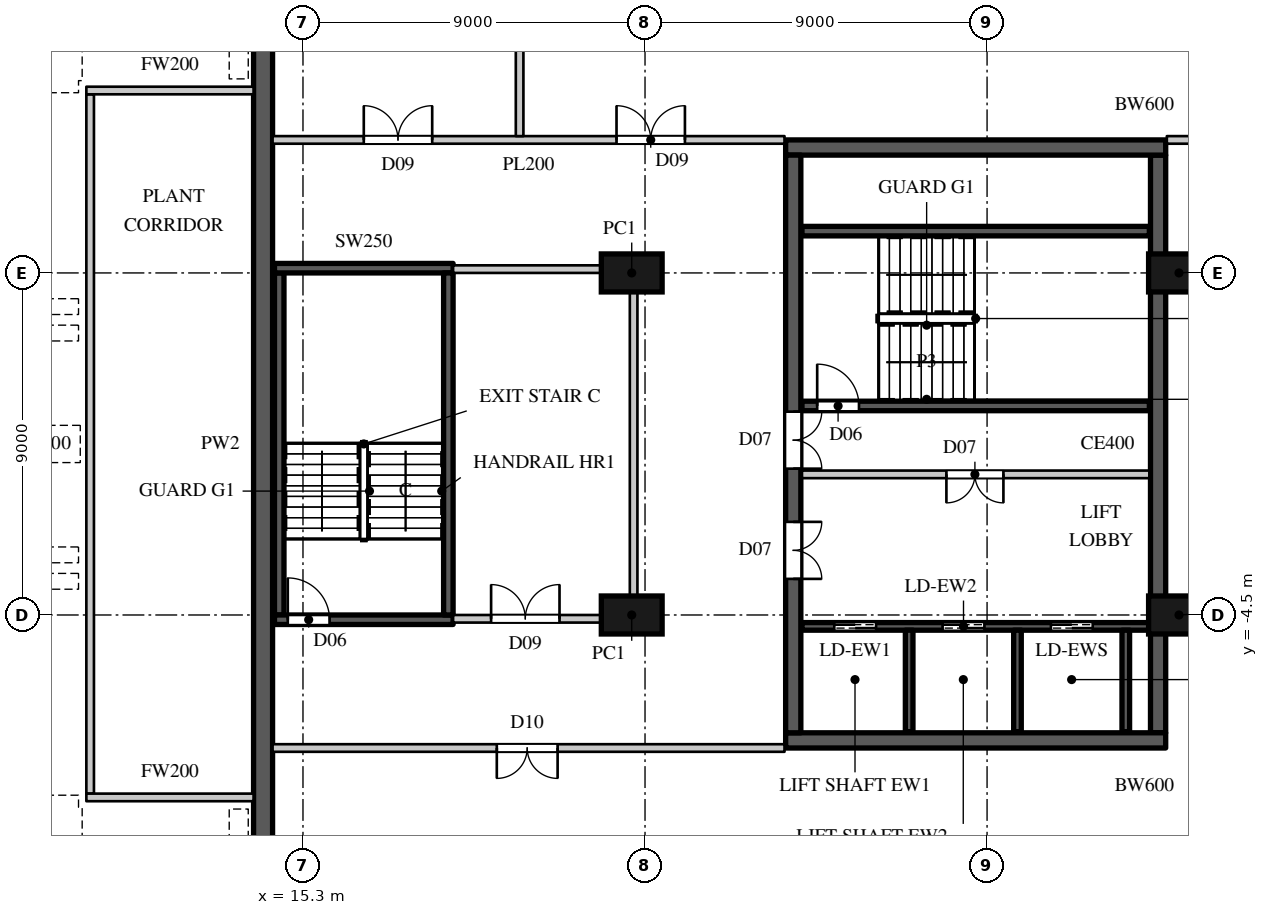
"""IFC4 building model, lengths in metres.
Left out: names, types, materials, properties, quantities, classifications, styles, units other than length and angle.
Written with IfcOpenShell. Run it as: python <this file> out.ifc"""

import sys

from ifc_helpers import new_model, si_unit, direction, frame, frame_2d, origin, origin_2d, place, context, subcontext, project, spatial, rectangle, extrude, element, fill, save


model = new_model("IFC4")
c1 = context("Model", 3, precision=1e-05, world=origin(), true_north=direction((0.0, 1.0)))
c2 = subcontext(c1, "Body", "Model", "MODEL_VIEW")
j1 = project(units=[si_unit("LENGTHUNIT", "METRE"), si_unit("PLANEANGLEUNIT", "RADIAN")], contexts=[c1])
p1 = place(None, origin())
s1 = spatial("IfcSite", under=j1, at=p1, CompositionType="ELEMENT")
p2 = place(p1, origin())
s2 = spatial("IfcBuilding", under=s1, at=p2, CompositionType="ELEMENT")
p3 = place(p2, frame((0.0, 0.0, 29.0)))
s3 = spatial("IfcBuildingStorey", under=s2, at=p3, CompositionType="ELEMENT", Elevation=29.0)
p4 = place(p3, frame((14.25, -19.5, 0.0), z_axis=(0.0, 0.0, 1.0), x_axis=(0.0, 1.0, 0.0)))
e1 = element("IfcWall", 1, at=p4, inside=s3, PredefinedType="SOLIDWALL", context=c2, shape_type="SweptSolid", body=[
    extrude(rectangle(XDim=39.0, YDim=0.5, at=frame_2d((19.5, 0.0))), origin(), (0.0, 0.0, 1.0), 7.0),
])
for number, where, z_axis, x_axis in (
    (2, (23.95, -4.5, 0.0), (0.0, 0.0, 1.0), (0.0, 1.0, 0.0)),
    (3, (23.95, 4.5, 0.0), (0.0, 0.0, 1.0), (0.0, 1.0, 0.0)),
    (4, (38.35, -4.5, 0.0), (0.0, 0.0, 1.0), (0.0, 1.0, 0.0)),
    (5, (38.35, 4.5, 0.0), (0.0, 0.0, 1.0), (0.0, 1.0, 0.0)),
):
    element("IfcColumn", number, at=place(p3, frame(where, z_axis=z_axis, x_axis=x_axis)), inside=s3, PredefinedType="COLUMN", context=c2, shape_type="SweptSolid", body=[
        extrude(rectangle(XDim=1.0, YDim=1.6, at=origin_2d()), origin(), (0.0, 0.0, 1.0), 7.0),
    ])
for number, where, z_axis, x_axis in (
    (6, (28.0, 7.8, 0.0), (0.0, 0.0, 1.0), (1.0, 0.0, 0.0)),
    (7, (28.0, -7.8, 0.0), (0.0, 0.0, 1.0), (1.0, 0.0, 0.0)),
):
    element("IfcWall", number, at=place(p3, frame(where, z_axis=z_axis, x_axis=x_axis)), inside=s3, PredefinedType="SHEAR", context=c2, shape_type="SweptSolid", body=[
        extrude(rectangle(XDim=10.0, YDim=0.4, at=frame_2d((5.0, 0.0))), origin(), (0.0, 0.0, 1.0), 7.0),
    ])
p5 = place(p3, frame((37.8, -7.6, 0.0), z_axis=(0.0, 0.0, 1.0), x_axis=(0.0, 1.0, 0.0)))
e8 = element("IfcWall", 8, at=p5, inside=s3, PredefinedType="SHEAR", context=c2, shape_type="SweptSolid", body=[
    extrude(rectangle(XDim=15.2, YDim=0.4, at=frame_2d((7.6, 0.0))), origin(), (0.0, 0.0, 1.0), 7.0),
])
p6 = place(p3, frame((28.2, -7.6, 0.0), z_axis=(0.0, 0.0, 1.0), x_axis=(0.0, 1.0, 0.0)))
e9 = element("IfcWall", 9, at=p6, inside=s3, PredefinedType="SHEAR", context=c2, shape_type="SweptSolid", body=[
    extrude(rectangle(XDim=15.2, YDim=0.4, at=frame_2d((7.6, 0.0))), origin(), (0.0, 0.0, 1.0), 7.0),
])
p7 = place(p6, frame((4.05, 0.0, 0.0)))
e10 = element("IfcOpeningElement", 10, at=p7, cuts=e9, PredefinedType="OPENING", context=c2, shape_type="SweptSolid", body=[
    extrude(rectangle(XDim=1.5, YDim=2.4, at=frame_2d((0.75, 1.2))), frame((0.0, 0.21, 0.0), z_axis=(0.0, -1.0, 0.0), x_axis=(1.0, 0.0, 0.0)), (0.0, 0.0, 1.0), 0.42),
])
p8 = place(p6, frame((6.95, 0.0, 0.0)))
e11 = element("IfcOpeningElement", 11, at=p8, cuts=e9, PredefinedType="OPENING", context=c2, shape_type="SweptSolid", body=[
    extrude(rectangle(XDim=1.5, YDim=2.4, at=frame_2d((0.75, 1.2))), frame((0.0, 0.21, 0.0), z_axis=(0.0, -1.0, 0.0), x_axis=(1.0, 0.0, 0.0)), (0.0, 0.0, 1.0), 0.42),
])
p9 = place(p3, frame((9.7, -9.2, 0.0), z_axis=(0.0, 0.0, 1.0), x_axis=(0.0, 1.0, 0.0)))
e12 = element("IfcWall", 12, at=p9, inside=s3, PredefinedType="PARTITIONING", context=c2, shape_type="SweptSolid", body=[
    extrude(rectangle(XDim=18.4, YDim=0.2, at=frame_2d((9.2, 0.0))), origin(), (0.0, 0.0, 1.0), 6.598),
])
for number, where, z_axis, x_axis in (
    (13, (9.6, -9.3, 0.0), (0.0, 0.0, 1.0), (1.0, 0.0, 0.0)),
    (14, (9.6, 9.3, 0.0), (0.0, 0.0, 1.0), (1.0, 0.0, 0.0)),
):
    element("IfcWall", number, at=place(p3, frame(where, z_axis=z_axis, x_axis=x_axis)), inside=s3, PredefinedType="PARTITIONING", context=c2, shape_type="SweptSolid", body=[
        extrude(rectangle(XDim=4.4, YDim=0.2, at=frame_2d((2.2, 0.0))), origin(), (0.0, 0.0, 1.0), 6.598),
    ])
p10 = place(p3, frame((14.5, -8.0, 0.0), z_axis=(0.0, 0.0, 1.0), x_axis=(1.0, 0.0, 0.0)))
e15 = element("IfcWall", 15, at=p10, inside=s3, PredefinedType="PARTITIONING", context=c2, shape_type="SweptSolid", body=[
    extrude(rectangle(XDim=13.47, YDim=0.2, at=frame_2d((6.735, 0.0))), origin(), (0.0, 0.0, 1.0), 6.598),
])
p11 = place(p10, frame((5.9, 0.0, 0.0)))
e16 = element("IfcOpeningElement", 16, at=p11, cuts=e15, PredefinedType="OPENING", context=c2, shape_type="SweptSolid", body=[
    extrude(rectangle(XDim=1.6, YDim=2.4, at=frame_2d((0.8, 1.2))), frame((0.0, 0.11, 0.0), z_axis=(0.0, -1.0, 0.0), x_axis=(1.0, 0.0, 0.0)), (0.0, 0.0, 1.0), 0.22),
])
p12 = place(p3, frame((28.43, -0.8, 0.0), z_axis=(0.0, 0.0, 1.0), x_axis=(1.0, 0.0, 0.0)))
e17 = element("IfcWall", 17, at=p12, inside=s3, PredefinedType="PARTITIONING", context=c2, shape_type="SweptSolid", body=[
    extrude(rectangle(XDim=9.14, YDim=0.2, at=frame_2d((4.57, 0.0))), origin(), (0.0, 0.0, 1.0), 6.598),
])
p13 = place(p12, frame((3.8, 0.0, 0.0)))
e18 = element("IfcOpeningElement", 18, at=p13, cuts=e17, PredefinedType="OPENING", context=c2, shape_type="SweptSolid", body=[
    extrude(rectangle(XDim=1.5, YDim=2.4, at=frame_2d((0.75, 1.2))), frame((0.0, 0.11, 0.0), z_axis=(0.0, -1.0, 0.0), x_axis=(1.0, 0.0, 0.0)), (0.0, 0.0, 1.0), 0.22),
])
p14 = place(p3, frame((14.5, 8.0, 0.0), z_axis=(0.0, 0.0, 1.0), x_axis=(1.0, 0.0, 0.0)))
e19 = element("IfcWall", 19, at=p14, inside=s3, PredefinedType="PARTITIONING", context=c2, shape_type="SweptSolid", body=[
    extrude(rectangle(XDim=13.47, YDim=0.2, at=frame_2d((6.735, 0.0))), origin(), (0.0, 0.0, 1.0), 6.598),
])
p15 = place(p14, frame((2.4, 0.0, 0.0)))
e20 = element("IfcOpeningElement", 20, at=p15, cuts=e19, PredefinedType="OPENING", context=c2, shape_type="SweptSolid", body=[
    extrude(rectangle(XDim=1.8, YDim=2.4, at=frame_2d((0.9, 1.2))), frame((0.0, 0.11, 0.0), z_axis=(0.0, -1.0, 0.0), x_axis=(1.0, 0.0, 0.0)), (0.0, 0.0, 1.0), 0.22),
])
p16 = place(p14, frame((9.05, 0.0, 0.0)))
e21 = element("IfcOpeningElement", 21, at=p16, cuts=e19, PredefinedType="OPENING", context=c2, shape_type="SweptSolid", body=[
    extrude(rectangle(XDim=1.8, YDim=2.4, at=frame_2d((0.9, 1.2))), frame((0.0, 0.11, 0.0), z_axis=(0.0, -1.0, 0.0), x_axis=(1.0, 0.0, 0.0)), (0.0, 0.0, 1.0), 0.22),
])
p17 = place(p3, frame((19.25, -4.6, 0.0), z_axis=(0.0, 0.0, 1.0), x_axis=(1.0, 0.0, 0.0)))
e22 = element("IfcWall", 22, at=p17, inside=s3, PredefinedType="PARTITIONING", context=c2, shape_type="SweptSolid", body=[
    extrude(rectangle(XDim=3.9, YDim=0.2, at=frame_2d((1.95, 0.0))), origin(), (0.0, 0.0, 1.0), 6.598),
])
p18 = place(p17, frame((1.0, 0.0, 0.0)))
e23 = element("IfcOpeningElement", 23, at=p18, cuts=e22, PredefinedType="OPENING", context=c2, shape_type="SweptSolid", body=[
    extrude(rectangle(XDim=1.8, YDim=2.4, at=frame_2d((0.9, 1.2))), frame((0.0, 0.11, 0.0), z_axis=(0.0, -1.0, 0.0), x_axis=(1.0, 0.0, 0.0)), (0.0, 0.0, 1.0), 0.22),
])
p19 = place(p3, frame((19.25, 4.6, 0.0), z_axis=(0.0, 0.0, 1.0), x_axis=(1.0, 0.0, 0.0)))
e24 = element("IfcWall", 24, at=p19, inside=s3, PredefinedType="PARTITIONING", context=c2, shape_type="SweptSolid", body=[
    extrude(rectangle(XDim=3.9, YDim=0.2, at=frame_2d((1.95, 0.0))), origin(), (0.0, 0.0, 1.0), 6.598),
])
p20 = place(p3, frame((21.0, 8.1, 0.0), z_axis=(0.0, 0.0, 1.0), x_axis=(0.0, 1.0, 0.0)))
e25 = element("IfcWall", 25, at=p20, inside=s3, PredefinedType="PARTITIONING", context=c2, shape_type="SweptSolid", body=[
    extrude(rectangle(XDim=19.025, YDim=0.2, at=frame_2d((9.512, 0.0))), origin(), (0.0, 0.0, 1.0), 6.598),
])
p21 = place(p3, frame((24.0, -4.0, 0.0), z_axis=(0.0, 0.0, 1.0), x_axis=(0.0, 1.0, 0.0)))
e26 = element("IfcWall", 26, at=p21, inside=s3, PredefinedType="PARTITIONING", context=c2, shape_type="SweptSolid", body=[
    extrude(rectangle(XDim=8.0, YDim=0.2, at=frame_2d((4.0, 0.0))), origin(), (0.0, 0.0, 1.0), 6.598),
])
p22 = place(p3, frame((38.03, 8.0, 0.0), z_axis=(0.0, 0.0, 1.0), x_axis=(1.0, 0.0, 0.0)))
e27 = element("IfcWall", 27, at=p22, inside=s3, PredefinedType="PARTITIONING", context=c2, shape_type="SweptSolid", body=[
    extrude(rectangle(XDim=0.595, YDim=0.2, at=frame_2d((0.297, 0.0))), origin(), (0.0, 0.0, 1.0), 6.598),
])
p23 = place(p3, frame((28.43, -4.8, 0.0), z_axis=(0.0, 0.0, 1.0), x_axis=(1.0, 0.0, 0.0)))
e28 = element("IfcWall", 28, at=p23, inside=s3, PredefinedType="SHEAR", context=c2, shape_type="SweptSolid", body=[
    extrude(rectangle(XDim=9.13, YDim=0.2, at=frame_2d((4.565, 0.0))), origin(), (0.0, 0.0, 1.0), 6.598),
])
p24 = place(p23, frame((0.85, 0.0, 0.0)))
e29 = element("IfcOpeningElement", 29, at=p24, cuts=e28, PredefinedType="OPENING", context=c2, shape_type="SweptSolid", body=[
    extrude(rectangle(XDim=1.1, YDim=2.2, at=frame_2d((0.55, 1.1))), frame((0.0, 0.11, 0.0), z_axis=(0.0, -1.0, 0.0), x_axis=(1.0, 0.0, 0.0)), (0.0, 0.0, 1.0), 0.22),
])
p25 = place(p23, frame((3.7, 0.0, 0.0)))
e30 = element("IfcOpeningElement", 30, at=p25, cuts=e28, PredefinedType="OPENING", context=c2, shape_type="SweptSolid", body=[
    extrude(rectangle(XDim=1.1, YDim=2.2, at=frame_2d((0.55, 1.1))), frame((0.0, 0.11, 0.0), z_axis=(0.0, -1.0, 0.0), x_axis=(1.0, 0.0, 0.0)), (0.0, 0.0, 1.0), 0.22),
])
p26 = place(p23, frame((6.55, 0.0, 0.0)))
e31 = element("IfcOpeningElement", 31, at=p26, cuts=e28, PredefinedType="OPENING", context=c2, shape_type="SweptSolid", body=[
    extrude(rectangle(XDim=1.1, YDim=2.2, at=frame_2d((0.55, 1.1))), frame((0.0, 0.11, 0.0), z_axis=(0.0, -1.0, 0.0), x_axis=(1.0, 0.0, 0.0)), (0.0, 0.0, 1.0), 0.22),
])
for number, where, z_axis, x_axis in (
    (32, (31.25, -7.57, 0.0), (0.0, 0.0, 1.0), (0.0, 1.0, 0.0)),
    (33, (34.1, -7.57, 0.0), (0.0, 0.0, 1.0), (0.0, 1.0, 0.0)),
):
    element("IfcWall", number, at=place(p3, frame(where, z_axis=z_axis, x_axis=x_axis)), inside=s3, PredefinedType="SHEAR", context=c2, shape_type="SweptSolid", body=[
        extrude(rectangle(XDim=2.67, YDim=0.2, at=frame_2d((1.335, 0.0))), origin(), (0.0, 0.0, 1.0), 7.0),
    ])
p27 = place(p3, frame((36.95, -7.57, 0.0), z_axis=(0.0, 0.0, 1.0), x_axis=(0.0, 1.0, 0.0)))
e34 = element("IfcWall", 34, at=p27, inside=s3, PredefinedType="SHEAR", context=c2, shape_type="SweptSolid", body=[
    extrude(rectangle(XDim=2.67, YDim=0.2, at=frame_2d((1.335, 0.0))), origin(), (0.0, 0.0, 1.0), 6.598),
])
p28 = place(p3, frame((14.675, -4.5, 0.0), z_axis=(0.0, 0.0, 1.0), x_axis=(0.0, 1.0, 0.0)))
e35 = element("IfcWall", 35, at=p28, inside=s3, PredefinedType="SHEAR", context=c2, shape_type="SweptSolid", body=[
    extrude(rectangle(XDim=9.0, YDim=0.25, at=frame_2d((4.5, 0.0))), origin(), (0.0, 0.0, 1.0), 6.6),
])
p29 = place(p3, frame((14.55, -4.625, 0.0), z_axis=(0.0, 0.0, 1.0), x_axis=(1.0, 0.0, 0.0)))
e36 = element("IfcWall", 36, at=p29, inside=s3, PredefinedType="SHEAR", context=c2, shape_type="SweptSolid", body=[
    extrude(rectangle(XDim=4.7, YDim=0.25, at=frame_2d((2.35, 0.0))), origin(), (0.0, 0.0, 1.0), 6.6),
])
p30 = place(p29, frame((0.35, 0.0, 0.0)))
e37 = element("IfcOpeningElement", 37, at=p30, cuts=e36, PredefinedType="OPENING", context=c2, shape_type="SweptSolid", body=[
    extrude(rectangle(XDim=1.1, YDim=2.2, at=frame_2d((0.55, 1.1))), frame((0.0, 0.135, 0.0), z_axis=(0.0, -1.0, 0.0), x_axis=(1.0, 0.0, 0.0)), (0.0, 0.0, 1.0), 0.27),
])
p31 = place(p3, frame((14.55, 4.625, 0.0), z_axis=(0.0, 0.0, 1.0), x_axis=(1.0, 0.0, 0.0)))
e38 = element("IfcWall", 38, at=p31, inside=s3, PredefinedType="SHEAR", context=c2, shape_type="SweptSolid", body=[
    extrude(rectangle(XDim=4.7, YDim=0.25, at=frame_2d((2.35, 0.0))), origin(), (0.0, 0.0, 1.0), 6.6),
])
p32 = place(p3, frame((19.125, -4.5, 0.0), z_axis=(0.0, 0.0, 1.0), x_axis=(0.0, 1.0, 0.0)))
e39 = element("IfcWall", 39, at=p32, inside=s3, PredefinedType="SHEAR", context=c2, shape_type="SweptSolid", body=[
    extrude(rectangle(XDim=9.0, YDim=0.25, at=frame_2d((4.5, 0.0))), origin(), (0.0, 0.0, 1.0), 6.6),
])
p33 = place(p3, frame((28.43, 1.0, 0.0), z_axis=(0.0, 0.0, 1.0), x_axis=(1.0, 0.0, 0.0)))
e40 = element("IfcWall", 40, at=p33, inside=s3, PredefinedType="SHEAR", context=c2, shape_type="SweptSolid", body=[
    extrude(rectangle(XDim=9.14, YDim=0.25, at=frame_2d((4.57, 0.0))), origin(), (0.0, 0.0, 1.0), 6.598),
])
p34 = place(p33, frame((0.4, 0.0, 0.0)))
e41 = element("IfcOpeningElement", 41, at=p34, cuts=e40, PredefinedType="OPENING", context=c2, shape_type="SweptSolid", body=[
    extrude(rectangle(XDim=1.1, YDim=2.2, at=frame_2d((0.55, 1.1))), frame((0.0, 0.135, 0.0), z_axis=(0.0, -1.0, 0.0), x_axis=(1.0, 0.0, 0.0)), (0.0, 0.0, 1.0), 0.27),
])
p35 = place(p3, frame((28.43, 5.6, 0.0), z_axis=(0.0, 0.0, 1.0), x_axis=(1.0, 0.0, 0.0)))
e42 = element("IfcWall", 42, at=p35, inside=s3, PredefinedType="SHEAR", context=c2, shape_type="SweptSolid", body=[
    extrude(rectangle(XDim=9.14, YDim=0.25, at=frame_2d((4.57, 0.0))), origin(), (0.0, 0.0, 1.0), 6.598),
])
p36 = place(p34, origin())
e43 = element("IfcDoor", 43, at=p36, inside=s3, OperationType="SINGLE_SWING_LEFT", PredefinedType="DOOR", context=c2, shape_type="SweptSolid", body=[
    extrude(rectangle(XDim=1.1, YDim=2.2, at=frame_2d((0.55, 1.1))), frame((0.0, 0.025, 0.0), z_axis=(0.0, -1.0, 0.0), x_axis=(1.0, 0.0, 0.0)), (0.0, 0.0, 1.0), 0.05),
])
fill(e41, e43)
p37 = place(p13, origin())
e44 = element("IfcDoor", 44, at=p37, inside=s3, OperationType="DOUBLE_DOOR_SINGLE_SWING", PredefinedType="DOOR", context=c2, shape_type="SweptSolid", body=[
    extrude(rectangle(XDim=1.5, YDim=2.4, at=frame_2d((0.75, 1.2))), frame((0.0, 0.025, 0.0), z_axis=(0.0, -1.0, 0.0), x_axis=(1.0, 0.0, 0.0)), (0.0, 0.0, 1.0), 0.05),
])
fill(e18, e44)
p38 = place(p24, origin())
e45 = element("IfcDoor", 45, at=p38, inside=s3, OperationType="DOUBLE_DOOR_SLIDING", PredefinedType="DOOR", context=c2, shape_type="SweptSolid", body=[
    extrude(rectangle(XDim=1.1, YDim=2.2, at=frame_2d((0.55, 1.1))), frame((0.0, 0.025, 0.0), z_axis=(0.0, -1.0, 0.0), x_axis=(1.0, 0.0, 0.0)), (0.0, 0.0, 1.0), 0.05),
])
fill(e29, e45)
p39 = place(p25, origin())
e46 = element("IfcDoor", 46, at=p39, inside=s3, OperationType="DOUBLE_DOOR_SLIDING", PredefinedType="DOOR", context=c2, shape_type="SweptSolid", body=[
    extrude(rectangle(XDim=1.1, YDim=2.2, at=frame_2d((0.55, 1.1))), frame((0.0, 0.025, 0.0), z_axis=(0.0, -1.0, 0.0), x_axis=(1.0, 0.0, 0.0)), (0.0, 0.0, 1.0), 0.05),
])
fill(e30, e46)
p40 = place(p26, origin())
e47 = element("IfcDoor", 47, at=p40, inside=s3, OperationType="DOUBLE_DOOR_SLIDING", PredefinedType="DOOR", context=c2, shape_type="SweptSolid", body=[
    extrude(rectangle(XDim=1.1, YDim=2.2, at=frame_2d((0.55, 1.1))), frame((0.0, 0.025, 0.0), z_axis=(0.0, -1.0, 0.0), x_axis=(1.0, 0.0, 0.0)), (0.0, 0.0, 1.0), 0.05),
])
fill(e31, e47)
p41 = place(p11, origin())
e48 = element("IfcDoor", 48, at=p41, inside=s3, OperationType="DOUBLE_DOOR_SINGLE_SWING", PredefinedType="DOOR", context=c2, shape_type="SweptSolid", body=[
    extrude(rectangle(XDim=1.6, YDim=2.4, at=frame_2d((0.8, 1.2))), frame((0.0, 0.025, 0.0), z_axis=(0.0, -1.0, 0.0), x_axis=(1.0, 0.0, 0.0)), (0.0, 0.0, 1.0), 0.05),
])
fill(e16, e48)
p42 = place(p15, origin())
e49 = element("IfcDoor", 49, at=p42, inside=s3, OperationType="DOUBLE_DOOR_SINGLE_SWING", PredefinedType="DOOR", context=c2, shape_type="SweptSolid", body=[
    extrude(rectangle(XDim=1.8, YDim=2.4, at=frame_2d((0.9, 1.2))), frame((0.0, 0.025, 0.0), z_axis=(0.0, -1.0, 0.0), x_axis=(1.0, 0.0, 0.0)), (0.0, 0.0, 1.0), 0.05),
])
fill(e20, e49)
p43 = place(p16, origin())
e50 = element("IfcDoor", 50, at=p43, inside=s3, OperationType="DOUBLE_DOOR_SINGLE_SWING", PredefinedType="DOOR", context=c2, shape_type="SweptSolid", body=[
    extrude(rectangle(XDim=1.8, YDim=2.4, at=frame_2d((0.9, 1.2))), frame((0.0, 0.025, 0.0), z_axis=(0.0, -1.0, 0.0), x_axis=(1.0, 0.0, 0.0)), (0.0, 0.0, 1.0), 0.05),
])
fill(e21, e50)
p44 = place(p18, origin())
e51 = element("IfcDoor", 51, at=p44, inside=s3, OperationType="DOUBLE_DOOR_SINGLE_SWING", PredefinedType="DOOR", context=c2, shape_type="SweptSolid", body=[
    extrude(rectangle(XDim=1.8, YDim=2.4, at=frame_2d((0.9, 1.2))), frame((0.0, 0.025, 0.0), z_axis=(0.0, -1.0, 0.0), x_axis=(1.0, 0.0, 0.0)), (0.0, 0.0, 1.0), 0.05),
])
fill(e23, e51)
p45 = place(p7, origin())
e52 = element("IfcDoor", 52, at=p45, inside=s3, OperationType="DOUBLE_DOOR_SINGLE_SWING", PredefinedType="DOOR", context=c2, shape_type="SweptSolid", body=[
    extrude(rectangle(XDim=1.5, YDim=2.4, at=frame_2d((0.75, 1.2))), frame((0.0, 0.025, 0.0), z_axis=(0.0, -1.0, 0.0), x_axis=(1.0, 0.0, 0.0)), (0.0, 0.0, 1.0), 0.05),
])
fill(e10, e52)
p46 = place(p8, origin())
e53 = element("IfcDoor", 53, at=p46, inside=s3, OperationType="DOUBLE_DOOR_SINGLE_SWING", PredefinedType="DOOR", context=c2, shape_type="SweptSolid", body=[
    extrude(rectangle(XDim=1.5, YDim=2.4, at=frame_2d((0.75, 1.2))), frame((0.0, 0.025, 0.0), z_axis=(0.0, -1.0, 0.0), x_axis=(1.0, 0.0, 0.0)), (0.0, 0.0, 1.0), 0.05),
])
fill(e11, e53)
p47 = place(p30, origin())
e54 = element("IfcDoor", 54, at=p47, inside=s3, OperationType="SINGLE_SWING_LEFT", PredefinedType="DOOR", context=c2, shape_type="SweptSolid", body=[
    extrude(rectangle(XDim=1.1, YDim=2.2, at=frame_2d((0.55, 1.1))), frame((0.0, 0.025, 0.0), z_axis=(0.0, -1.0, 0.0), x_axis=(1.0, 0.0, 0.0)), (0.0, 0.0, 1.0), 0.05),
])
fill(e37, e54)
save(model, sys.argv[1])
